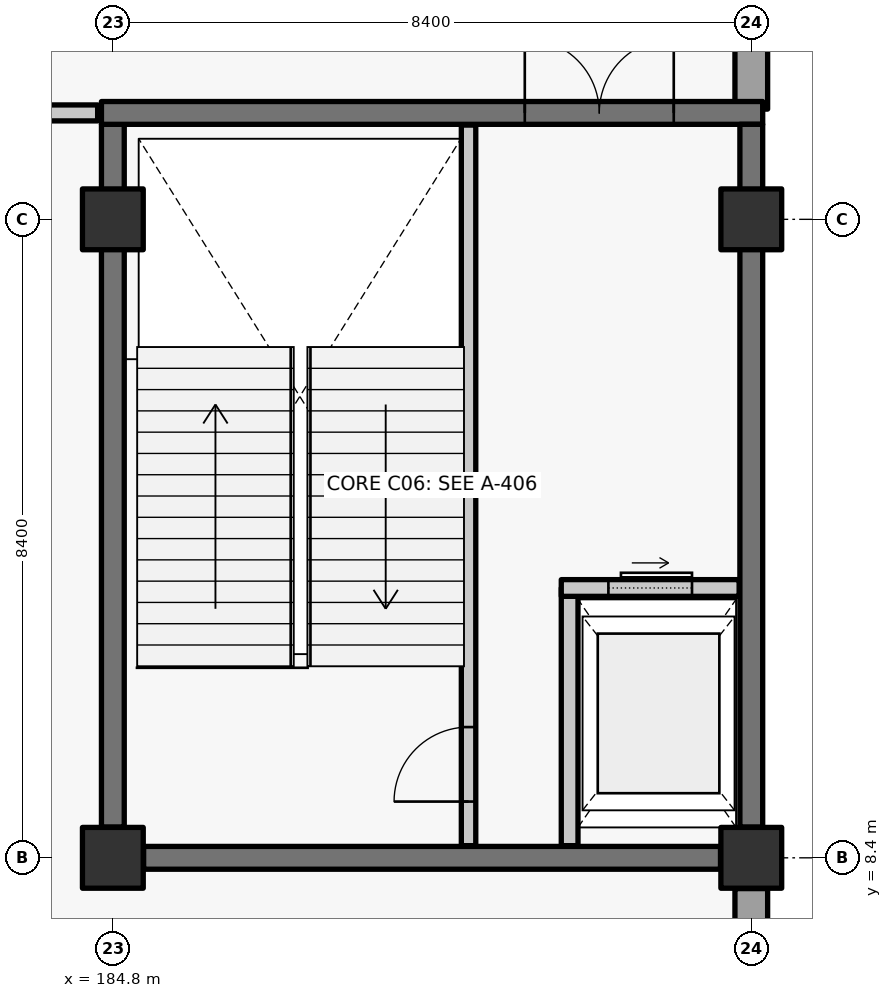
"""IFC4 building model, lengths in metres.
Left out: names, types, materials, properties, quantities, classifications, styles, units other than length and angle.
Written with IfcOpenShell. Run it as: python <this file> out.ifc"""

import sys

from ifc_helpers import new_model, si_unit, direction, frame, frame_2d, origin, origin_2d, place, context, subcontext, project, spatial, rectangle, extrude, element, fill, save


model = new_model("IFC4")
c1 = context("Model", 3, precision=1e-05, world=origin(), true_north=direction((0.0, 1.0)))
c2 = subcontext(c1, "Body", "Model", "MODEL_VIEW")
j1 = project(units=[si_unit("LENGTHUNIT", "METRE"), si_unit("PLANEANGLEUNIT", "RADIAN")], contexts=[c1])
p1 = place(None, origin())
s1 = spatial("IfcSite", under=j1, at=p1, CompositionType="ELEMENT")
p2 = place(p1, origin())
s2 = spatial("IfcBuilding", under=s1, at=p2, CompositionType="ELEMENT")
p3 = place(p2, frame((0.0, 0.0, 6.0)))
s3 = spatial("IfcBuildingStorey", under=s2, at=p3, CompositionType="ELEMENT", Elevation=6.0)
for number, where, z_axis, x_axis in (
    (1, (184.8, 8.4, 0.0), (0.0, 0.0, 1.0), (1.0, 0.0, 0.0)),
    (2, (184.8, 16.8, 0.0), (0.0, 0.0, 1.0), (1.0, 0.0, 0.0)),
    (3, (193.2, 8.4, 0.0), (0.0, 0.0, 1.0), (1.0, 0.0, 0.0)),
    (4, (193.2, 16.8, 0.0), (0.0, 0.0, 1.0), (1.0, 0.0, 0.0)),
):
    element("IfcColumn", number, at=place(p3, frame(where, z_axis=z_axis, x_axis=x_axis)), inside=s3, PredefinedType="COLUMN", context=c2, shape_type="SweptSolid", body=[
        extrude(rectangle(XDim=0.8, YDim=0.8, at=origin_2d()), origin(), (0.0, 0.0, 1.0), 5.4),
    ])
p4 = place(p3, frame((193.2, 7.995, 0.0), z_axis=(0.0, 0.0, 1.0), x_axis=(0.0, -1.0, 0.0)))
e5 = element("IfcWall", 5, at=p4, inside=s3, PredefinedType="SOLIDWALL", context=c2, shape_type="SweptSolid", body=[
    extrude(rectangle(XDim=7.59, YDim=0.43, at=frame_2d((3.795, 0.0))), origin(), (0.0, 0.0, 1.0), 5.12),
])
p5 = place(p4, frame((2.895, 0.0, 1.0)))
e6 = element("IfcOpeningElement", 6, at=p5, cuts=e5, PredefinedType="OPENING", context=c2, shape_type="SweptSolid", body=[
    extrude(rectangle(XDim=1.8, YDim=1.65, at=frame_2d((0.9, 0.825))), frame((0.0, 0.225, 0.0), z_axis=(0.0, -1.0, 0.0), x_axis=(1.0, 0.0, 0.0)), (0.0, 0.0, 1.0), 0.45),
])
p6 = place(p3, frame((193.2, 24.795, 0.0), z_axis=(0.0, 0.0, 1.0), x_axis=(0.0, -1.0, 0.0)))
e7 = element("IfcWall", 7, at=p6, inside=s3, PredefinedType="SOLIDWALL", context=c2, shape_type="SweptSolid", body=[
    extrude(rectangle(XDim=6.545, YDim=0.43, at=frame_2d((3.272, 0.0))), origin(), (0.0, 0.0, 1.0), 5.12),
])
p7 = place(p6, frame((2.395, 0.0, 1.0)))
e8 = element("IfcOpeningElement", 8, at=p7, cuts=e7, PredefinedType="OPENING", context=c2, shape_type="SweptSolid", body=[
    extrude(rectangle(XDim=1.8, YDim=1.65, at=frame_2d((0.9, 0.825))), frame((0.0, 0.225, 0.0), z_axis=(0.0, -1.0, 0.0), x_axis=(1.0, 0.0, 0.0)), (0.0, 0.0, 1.0), 0.45),
])
p8 = place(p3, frame((192.795, 8.4, 0.0), z_axis=(0.0, 0.0, 1.0), x_axis=(-1.0, 0.0, 0.0)))
e9 = element("IfcWall", 9, at=p8, inside=s3, PredefinedType="SHEAR", context=c2, shape_type="SweptSolid", body=[
    extrude(rectangle(XDim=7.59, YDim=0.3, at=frame_2d((3.795, 0.0))), origin(), (0.0, 0.0, 1.0), 5.12),
])
p9 = place(p3, frame((184.8, 8.805, 0.0), z_axis=(0.0, 0.0, 1.0), x_axis=(0.0, 1.0, 0.0)))
e10 = element("IfcWall", 10, at=p9, inside=s3, PredefinedType="SHEAR", context=c2, shape_type="SweptSolid", body=[
    extrude(rectangle(XDim=9.245, YDim=0.3, at=frame_2d((4.623, 0.0))), origin(), (0.0, 0.0, 1.0), 5.12),
])
p10 = place(p3, frame((184.65, 18.2, 0.0), z_axis=(0.0, 0.0, 1.0), x_axis=(1.0, 0.0, 0.0)))
e11 = element("IfcWall", 11, at=p10, inside=s3, PredefinedType="SHEAR", context=c2, shape_type="SweptSolid", body=[
    extrude(rectangle(XDim=8.7, YDim=0.3, at=frame_2d((4.35, 0.0))), origin(), (0.0, 0.0, 1.0), 5.12),
])
p11 = place(p10, frame((5.57, 0.0, 0.0)))
e12 = element("IfcOpeningElement", 12, at=p11, cuts=e11, PredefinedType="OPENING", context=c2, shape_type="SweptSolid", body=[
    extrude(rectangle(XDim=1.96, YDim=2.2, at=frame_2d((0.98, 1.1))), frame((0.0, 0.16, 0.0), z_axis=(0.0, -1.0, 0.0), x_axis=(1.0, 0.0, 0.0)), (0.0, 0.0, 1.0), 0.32),
])
p12 = place(p3, frame((193.2, 18.05, 0.0), z_axis=(0.0, 0.0, 1.0), x_axis=(0.0, -1.0, 0.0)))
e13 = element("IfcWall", 13, at=p12, inside=s3, PredefinedType="SHEAR", context=c2, shape_type="SweptSolid", body=[
    extrude(rectangle(XDim=9.245, YDim=0.3, at=frame_2d((4.623, 0.0))), origin(), (0.0, 0.0, 1.0), 5.12),
])
p13 = place(p3, frame((189.48, 8.56, 0.0), z_axis=(0.0, 0.0, 1.0), x_axis=(0.0, 1.0, 0.0)))
e14 = element("IfcWall", 14, at=p13, inside=s3, PredefinedType="SOLIDWALL", context=c2, shape_type="SweptSolid", body=[
    extrude(rectangle(XDim=9.48, YDim=0.19, at=frame_2d((4.74, 0.0))), origin(), (0.0, 0.0, 1.0), 5.12),
])
p14 = place(p13, frame((0.58, 0.0, 0.0)))
e15 = element("IfcOpeningElement", 15, at=p14, cuts=e14, PredefinedType="OPENING", context=c2, shape_type="SweptSolid", body=[
    extrude(rectangle(XDim=0.98, YDim=2.15, at=frame_2d((0.49, 1.075))), frame((0.0, 0.105, 0.0), z_axis=(0.0, -1.0, 0.0), x_axis=(1.0, 0.0, 0.0)), (0.0, 0.0, 1.0), 0.21),
])
p15 = place(p3, frame((190.81, 8.56, 0.0), z_axis=(0.0, 0.0, 1.0), x_axis=(0.0, 1.0, 0.0)))
e16 = element("IfcWall", 16, at=p15, inside=s3, PredefinedType="SOLIDWALL", context=c2, shape_type="SweptSolid", body=[
    extrude(rectangle(XDim=3.39, YDim=0.22, at=frame_2d((1.695, 0.0))), origin(), (0.0, 0.0, 1.0), 5.12),
])
p16 = place(p3, frame((190.7, 11.95, 0.0), z_axis=(0.0, 0.0, 1.0), x_axis=(1.0, 0.0, 0.0)))
e17 = element("IfcWall", 17, at=p16, inside=s3, PredefinedType="SOLIDWALL", context=c2, shape_type="SweptSolid", body=[
    extrude(rectangle(XDim=2.34, YDim=0.22, at=frame_2d((1.17, 0.0))), origin(), (0.0, 0.0, 1.0), 5.12),
])
p17 = place(p16, frame((0.62, 0.0, 0.0)))
e18 = element("IfcOpeningElement", 18, at=p17, cuts=e17, PredefinedType="OPENING", context=c2, shape_type="SweptSolid", body=[
    extrude(rectangle(XDim=1.1, YDim=2.2, at=frame_2d((0.55, 1.1))), frame((0.0, 0.12, 0.0), z_axis=(0.0, -1.0, 0.0), x_axis=(1.0, 0.0, 0.0)), (0.0, 0.0, 1.0), 0.24),
])
p18 = place(p3, frame((151.4, 18.2, 0.0), z_axis=(0.0, 0.0, 1.0), x_axis=(1.0, 0.0, 0.0)))
e19 = element("IfcWall", 19, at=p18, inside=s3, PredefinedType="PARTITIONING", context=c2, shape_type="SweptSolid", body=[
    extrude(rectangle(XDim=33.2, YDim=0.21, at=frame_2d((16.6, 0.0))), origin(), (0.0, 0.0, 1.0), 5.12),
])
p19 = place(p18, frame((3.5, 0.0, 0.0)))
e20 = element("IfcOpeningElement", 20, at=p19, cuts=e19, PredefinedType="OPENING", context=c2, shape_type="SweptSolid", body=[
    extrude(rectangle(XDim=1.0, YDim=2.15, at=frame_2d((0.5, 1.075))), frame((0.0, 0.115, 0.0), z_axis=(0.0, -1.0, 0.0), x_axis=(1.0, 0.0, 0.0)), (0.0, 0.0, 1.0), 0.23),
])
p20 = place(p18, frame((28.7, 0.0, 0.0)))
e21 = element("IfcOpeningElement", 21, at=p20, cuts=e19, PredefinedType="OPENING", context=c2, shape_type="SweptSolid", body=[
    extrude(rectangle(XDim=1.0, YDim=2.15, at=frame_2d((0.5, 1.075))), frame((0.0, 0.115, 0.0), z_axis=(0.0, -1.0, 0.0), x_axis=(1.0, 0.0, 0.0)), (0.0, 0.0, 1.0), 0.23),
])
p21 = place(p14, origin())
e22 = element("IfcDoor", 22, at=p21, inside=s3, OperationType="SINGLE_SWING_LEFT", PredefinedType="DOOR", context=c2, shape_type="SweptSolid", body=[
    extrude(rectangle(XDim=0.98, YDim=2.15, at=frame_2d((0.49, 1.075))), frame((0.0, 0.025, 0.0), z_axis=(0.0, -1.0, 0.0), x_axis=(1.0, 0.0, 0.0)), (0.0, 0.0, 1.0), 0.05),
])
fill(e15, e22)
p22 = place(p11, origin())
e23 = element("IfcDoor", 23, at=p22, inside=s3, OperationType="DOUBLE_DOOR_SINGLE_SWING", PredefinedType="DOOR", context=c2, shape_type="SweptSolid", body=[
    extrude(rectangle(XDim=1.96, YDim=2.2, at=frame_2d((0.98, 1.1))), frame((0.0, 0.025, 0.0), z_axis=(0.0, -1.0, 0.0), x_axis=(1.0, 0.0, 0.0)), (0.0, 0.0, 1.0), 0.05),
])
fill(e12, e23)
p23 = place(p17, origin())
e24 = element("IfcDoor", 24, at=p23, inside=s3, OperationType="SLIDING_TO_RIGHT", PredefinedType="DOOR", context=c2, shape_type="SweptSolid", body=[
    extrude(rectangle(XDim=1.1, YDim=2.2, at=frame_2d((0.55, 1.1))), frame((0.0, 0.025, 0.0), z_axis=(0.0, -1.0, 0.0), x_axis=(1.0, 0.0, 0.0)), (0.0, 0.0, 1.0), 0.05),
])
fill(e18, e24)
save(model, sys.argv[1])
